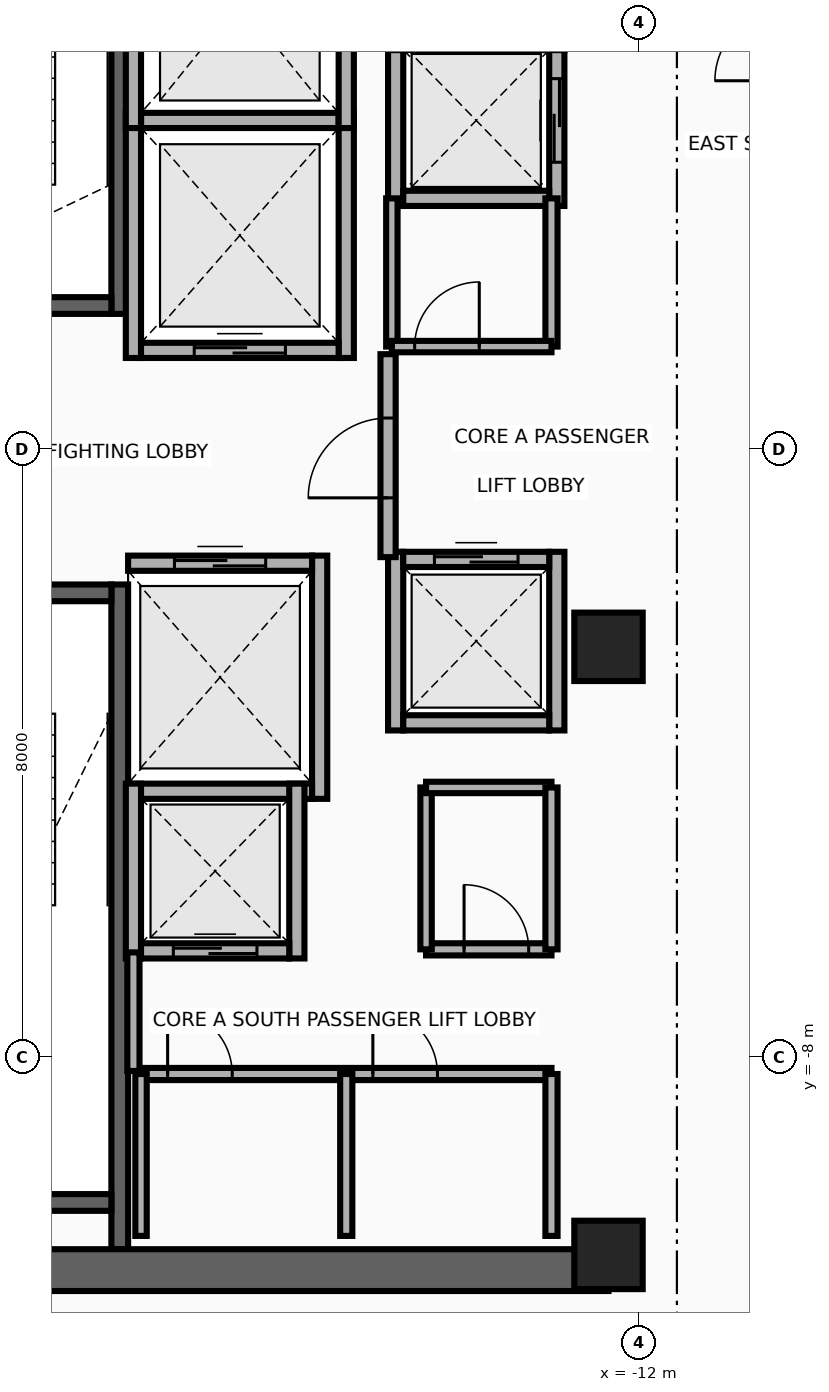
"""IFC4 building model, lengths in metres.
Left out: names, types, materials, properties, quantities, classifications, styles, units other than length and angle.
Written with IfcOpenShell. Run it as: python <this file> out.ifc"""

import sys

from ifc_helpers import new_model, si_unit, direction, frame, frame_2d, origin, origin_2d, place, context, subcontext, project, spatial, rectangle, extrude, source, transform, mapped, element, fill, save


model = new_model("IFC4")
c1 = context("Model", 3, precision=1e-05, world=origin(), true_north=direction((0.0, 1.0)))
c2 = subcontext(c1, "Body", "Model", "MODEL_VIEW")
j1 = project(units=[si_unit("LENGTHUNIT", "METRE"), si_unit("PLANEANGLEUNIT", "RADIAN")], contexts=[c1])
p1 = place(None, origin())
s1 = spatial("IfcSite", under=j1, at=p1, CompositionType="ELEMENT")
p2 = place(p1, origin())
s2 = spatial("IfcBuilding", under=s1, at=p2, CompositionType="ELEMENT")
p3 = place(p2, frame((0.0, 0.0, 230.0)))
s3 = spatial("IfcBuildingStorey", under=s2, at=p3, CompositionType="ELEMENT", Elevation=230.0)
p4 = place(p3, frame((-18.83, 1.78, 0.0), z_axis=(0.0, 0.0, 1.0), x_axis=(0.0, 1.0, 0.0)))
e1 = element("IfcWall", 1, at=p4, inside=s3, PredefinedType="SHEAR", context=c2, shape_type="SweptSolid", body=[
    extrude(rectangle(XDim=8.745, YDim=0.22, at=frame_2d((4.373, 0.0))), origin(), (0.0, 0.0, 1.0), 3.26),
])
p5 = place(p3, frame((-22.05, 1.89, 0.0), z_axis=(0.0, 0.0, 1.0), x_axis=(1.0, 0.0, 0.0)))
e2 = element("IfcWall", 2, at=p5, inside=s3, PredefinedType="SHEAR", context=c2, shape_type="SweptSolid", body=[
    extrude(rectangle(XDim=3.11, YDim=0.22, at=frame_2d((1.555, 0.0))), origin(), (0.0, 0.0, 1.0), 3.26),
])
p6 = place(p5, frame((1.0, 0.0, 0.0)))
e3 = element("IfcOpeningElement", 3, at=p6, cuts=e2, PredefinedType="OPENING", context=c2, shape_type="SweptSolid", body=[
    extrude(rectangle(XDim=1.1, YDim=2.15, at=frame_2d((0.55, 1.075))), frame((0.0, 0.125, 0.0), z_axis=(0.0, -1.0, 0.0), x_axis=(1.0, 0.0, 0.0)), (0.0, 0.0, 1.0), 0.25),
])
p7 = place(p3, frame((-18.83, -10.525, 0.0), z_axis=(0.0, 0.0, 1.0), x_axis=(0.0, 1.0, 0.0)))
e4 = element("IfcWall", 4, at=p7, inside=s3, PredefinedType="SHEAR", context=c2, shape_type="SweptSolid", body=[
    extrude(rectangle(XDim=8.745, YDim=0.22, at=frame_2d((4.373, 0.0))), origin(), (0.0, 0.0, 1.0), 3.26),
])
p8 = place(p3, frame((-22.05, -9.91, 0.0), z_axis=(0.0, 0.0, 1.0), x_axis=(1.0, 0.0, 0.0)))
e5 = element("IfcWall", 5, at=p8, inside=s3, PredefinedType="SHEAR", context=c2, shape_type="SweptSolid", body=[
    extrude(rectangle(XDim=3.11, YDim=0.22, at=frame_2d((1.555, 0.0))), origin(), (0.0, 0.0, 1.0), 3.26),
])
p9 = place(p3, frame((-22.05, -1.89, 0.0), z_axis=(0.0, 0.0, 1.0), x_axis=(1.0, 0.0, 0.0)))
e6 = element("IfcWall", 6, at=p9, inside=s3, PredefinedType="SHEAR", context=c2, shape_type="SweptSolid", body=[
    extrude(rectangle(XDim=3.11, YDim=0.22, at=frame_2d((1.555, 0.0))), origin(), (0.0, 0.0, 1.0), 3.26),
])
p10 = place(p9, frame((1.0, 0.0, 0.0)))
e7 = element("IfcOpeningElement", 7, at=p10, cuts=e6, PredefinedType="OPENING", context=c2, shape_type="SweptSolid", body=[
    extrude(rectangle(XDim=1.1, YDim=2.15, at=frame_2d((0.55, 1.075))), frame((0.0, 0.125, 0.0), z_axis=(0.0, -1.0, 0.0), x_axis=(1.0, 0.0, 0.0)), (0.0, 0.0, 1.0), 0.25),
])
p11 = place(p3, frame((-22.65, -10.8, 0.0), z_axis=(0.0, 0.0, 1.0), x_axis=(1.0, 0.0, 0.0)))
e8 = element("IfcWall", 8, at=p11, inside=s3, PredefinedType="SHEAR", context=c2, shape_type="SweptSolid", body=[
    extrude(rectangle(XDim=10.25, YDim=0.55, at=frame_2d((5.125, 0.0))), origin(), (0.0, 0.0, 1.0), 3.26),
])
m1 = source(origin(), c2, "Body", "SweptSolid", [
    extrude(rectangle(XDim=0.9, YDim=0.9, at=origin_2d()), origin(), (0.0, 0.0, 1.0), 3.5),
])
for number, where, z_axis, x_axis in (
    (9, (-12.4, -10.6, 0.0), (0.0, 0.0, 1.0), (1.0, 0.0, 0.0)),
    (10, (-12.4, -2.6, 0.0), (0.0, 0.0, 1.0), (1.0, 0.0, 0.0)),
):
    element("IfcColumn", number, at=place(p3, frame(where, z_axis=z_axis, x_axis=x_axis)), inside=s3, PredefinedType="COLUMN", context=c2, shape_type="MappedRepresentation", body=[
        mapped(m1, transform((0.0, 0.0, 0.0), x_axis=(1.0, 0.0, 0.0), y_axis=(0.0, 1.0, 0.0), z_axis=(0.0, 0.0, 1.0), scale=1.0)),
    ])
for number, where, z_axis, x_axis in (
    (11, (-18.65, 1.2, 0.0), (0.0, 0.0, 1.0), (0.0, 1.0, 0.0)),
    (12, (-15.85, 1.2, 0.0), (0.0, 0.0, 1.0), (0.0, 1.0, 0.0)),
):
    element("IfcWall", number, at=place(p3, frame(where, z_axis=z_axis, x_axis=x_axis)), inside=s3, PredefinedType="MOVABLE", context=c2, shape_type="SweptSolid", body=[
        extrude(rectangle(XDim=3.225, YDim=0.2, at=frame_2d((1.613, 0.0))), origin(), (0.0, 0.0, 1.0), 3.26),
    ])
p12 = place(p3, frame((-18.55, 1.3, 0.0), z_axis=(0.0, 0.0, 1.0), x_axis=(1.0, 0.0, 0.0)))
e13 = element("IfcWall", 13, at=p12, inside=s3, PredefinedType="MOVABLE", context=c2, shape_type="SweptSolid", body=[
    extrude(rectangle(XDim=2.6, YDim=0.2, at=frame_2d((1.3, 0.0))), origin(), (0.0, 0.0, 1.0), 3.26),
])
p13 = place(p12, frame((0.7, 0.0, 0.0)))
e14 = element("IfcOpeningElement", 14, at=p13, cuts=e13, PredefinedType="OPENING", context=c2, shape_type="SweptSolid", body=[
    extrude(rectangle(XDim=1.2, YDim=2.1, at=frame_2d((0.6, 1.05))), frame((0.0, 0.115, 0.0), z_axis=(0.0, -1.0, 0.0), x_axis=(1.0, 0.0, 0.0)), (0.0, 0.0, 1.0), 0.23),
])
p14 = place(p3, frame((-18.55, 4.325, 0.0), z_axis=(0.0, 0.0, 1.0), x_axis=(1.0, 0.0, 0.0)))
e15 = element("IfcWall", 15, at=p14, inside=s3, PredefinedType="MOVABLE", context=c2, shape_type="SweptSolid", body=[
    extrude(rectangle(XDim=2.6, YDim=0.2, at=frame_2d((1.3, 0.0))), origin(), (0.0, 0.0, 1.0), 3.26),
])
p15 = place(p3, frame((-16.2, -4.6, 0.0), z_axis=(0.0, 0.0, 1.0), x_axis=(0.0, 1.0, 0.0)))
e16 = element("IfcWall", 16, at=p15, inside=s3, PredefinedType="MOVABLE", context=c2, shape_type="SweptSolid", body=[
    extrude(rectangle(XDim=3.2, YDim=0.2, at=frame_2d((1.6, 0.0))), origin(), (0.0, 0.0, 1.0), 3.26),
])
p16 = place(p3, frame((-18.72, -4.5, 0.0), z_axis=(0.0, 0.0, 1.0), x_axis=(1.0, 0.0, 0.0)))
e17 = element("IfcWall", 17, at=p16, inside=s3, PredefinedType="MOVABLE", context=c2, shape_type="SweptSolid", body=[
    extrude(rectangle(XDim=2.42, YDim=0.2, at=frame_2d((1.21, 0.0))), origin(), (0.0, 0.0, 1.0), 3.26),
])
p17 = place(p3, frame((-18.72, -1.5, 0.0), z_axis=(0.0, 0.0, 1.0), x_axis=(1.0, 0.0, 0.0)))
e18 = element("IfcWall", 18, at=p17, inside=s3, PredefinedType="MOVABLE", context=c2, shape_type="SweptSolid", body=[
    extrude(rectangle(XDim=2.42, YDim=0.2, at=frame_2d((1.21, 0.0))), origin(), (0.0, 0.0, 1.0), 3.26),
])
p18 = place(p17, frame((0.61, 0.0, 0.0)))
e19 = element("IfcOpeningElement", 19, at=p18, cuts=e18, PredefinedType="OPENING", context=c2, shape_type="SweptSolid", body=[
    extrude(rectangle(XDim=1.2, YDim=2.1, at=frame_2d((0.6, 1.05))), frame((0.0, 0.115, 0.0), z_axis=(0.0, -1.0, 0.0), x_axis=(1.0, 0.0, 0.0)), (0.0, 0.0, 1.0), 0.23),
])
for number, where, z_axis, x_axis in (
    (20, (-18.65, 4.225, 0.0), (0.0, 0.0, 1.0), (0.0, 1.0, 0.0)),
    (21, (-15.85, 4.225, 0.0), (0.0, 0.0, 1.0), (0.0, 1.0, 0.0)),
):
    element("IfcWall", number, at=place(p3, frame(where, z_axis=z_axis, x_axis=x_axis)), inside=s3, PredefinedType="MOVABLE", context=c2, shape_type="SweptSolid", body=[
        extrude(rectangle(XDim=3.325, YDim=0.2, at=frame_2d((1.663, 0.0))), origin(), (0.0, 0.0, 1.0), 3.26),
    ])
p19 = place(p3, frame((-15.2, 3.2, 0.0), z_axis=(0.0, 0.0, 1.0), x_axis=(0.0, 1.0, 0.0)))
e22 = element("IfcWall", 22, at=p19, inside=s3, PredefinedType="MOVABLE", context=c2, shape_type="SweptSolid", body=[
    extrude(rectangle(XDim=2.25, YDim=0.2, at=frame_2d((1.125, 0.0))), origin(), (0.0, 0.0, 1.0), 3.26),
])
p20 = place(p3, frame((-13.08, 3.2, 0.0), z_axis=(0.0, 0.0, 1.0), x_axis=(0.0, 1.0, 0.0)))
e23 = element("IfcWall", 23, at=p20, inside=s3, PredefinedType="MOVABLE", context=c2, shape_type="SweptSolid", body=[
    extrude(rectangle(XDim=2.25, YDim=0.2, at=frame_2d((1.125, 0.0))), origin(), (0.0, 0.0, 1.0), 3.26),
])
p21 = place(p20, frame((0.575, 0.0, 0.0)))
e24 = element("IfcOpeningElement", 24, at=p21, cuts=e23, PredefinedType="OPENING", context=c2, shape_type="SweptSolid", body=[
    extrude(rectangle(XDim=1.1, YDim=2.1, at=frame_2d((0.55, 1.05))), frame((0.0, 0.115, 0.0), z_axis=(0.0, -1.0, 0.0), x_axis=(1.0, 0.0, 0.0)), (0.0, 0.0, 1.0), 0.23),
])
p22 = place(p3, frame((-15.1, 3.3, 0.0), z_axis=(0.0, 0.0, 1.0), x_axis=(1.0, 0.0, 0.0)))
e25 = element("IfcWall", 25, at=p22, inside=s3, PredefinedType="MOVABLE", context=c2, shape_type="SweptSolid", body=[
    extrude(rectangle(XDim=1.92, YDim=0.2, at=frame_2d((0.96, 0.0))), origin(), (0.0, 0.0, 1.0), 3.26),
])
for number, where, z_axis, x_axis in (
    (26, (-18.65, -6.7, 0.0), (0.0, 0.0, 1.0), (0.0, 1.0, 0.0)),
    (27, (-16.5, -6.7, 0.0), (0.0, 0.0, 1.0), (0.0, 1.0, 0.0)),
):
    element("IfcWall", number, at=place(p3, frame(where, z_axis=z_axis, x_axis=x_axis)), inside=s3, PredefinedType="MOVABLE", context=c2, shape_type="SweptSolid", body=[
        extrude(rectangle(XDim=2.3, YDim=0.2, at=frame_2d((1.15, 0.0))), origin(), (0.0, 0.0, 1.0), 3.26),
    ])
p23 = place(p3, frame((-18.55, -6.6, 0.0), z_axis=(0.0, 0.0, 1.0), x_axis=(1.0, 0.0, 0.0)))
e28 = element("IfcWall", 28, at=p23, inside=s3, PredefinedType="MOVABLE", context=c2, shape_type="SweptSolid", body=[
    extrude(rectangle(XDim=1.95, YDim=0.2, at=frame_2d((0.975, 0.0))), origin(), (0.0, 0.0, 1.0), 3.26),
])
p24 = place(p23, frame((0.425, 0.0, 0.0)))
e29 = element("IfcOpeningElement", 29, at=p24, cuts=e28, PredefinedType="OPENING", context=c2, shape_type="SweptSolid", body=[
    extrude(rectangle(XDim=1.1, YDim=2.1, at=frame_2d((0.55, 1.05))), frame((0.0, 0.115, 0.0), z_axis=(0.0, -1.0, 0.0), x_axis=(1.0, 0.0, 0.0)), (0.0, 0.0, 1.0), 0.23),
])
for number, where, z_axis, x_axis in (
    (30, (-15.2, -3.7, 0.0), (0.0, 0.0, 1.0), (0.0, 1.0, 0.0)),
    (31, (-13.08, -3.7, 0.0), (0.0, 0.0, 1.0), (0.0, 1.0, 0.0)),
):
    element("IfcWall", number, at=place(p3, frame(where, z_axis=z_axis, x_axis=x_axis)), inside=s3, PredefinedType="MOVABLE", context=c2, shape_type="SweptSolid", body=[
        extrude(rectangle(XDim=2.35, YDim=0.2, at=frame_2d((1.175, 0.0))), origin(), (0.0, 0.0, 1.0), 3.26),
    ])
p25 = place(p3, frame((-15.1, -3.6, 0.0), z_axis=(0.0, 0.0, 1.0), x_axis=(1.0, 0.0, 0.0)))
e32 = element("IfcWall", 32, at=p25, inside=s3, PredefinedType="MOVABLE", context=c2, shape_type="SweptSolid", body=[
    extrude(rectangle(XDim=1.92, YDim=0.2, at=frame_2d((0.96, 0.0))), origin(), (0.0, 0.0, 1.0), 3.26),
])
p26 = place(p3, frame((-15.1, -1.45, 0.0), z_axis=(0.0, 0.0, 1.0), x_axis=(1.0, 0.0, 0.0)))
e33 = element("IfcWall", 33, at=p26, inside=s3, PredefinedType="MOVABLE", context=c2, shape_type="SweptSolid", body=[
    extrude(rectangle(XDim=1.92, YDim=0.2, at=frame_2d((0.96, 0.0))), origin(), (0.0, 0.0, 1.0), 3.26),
])
p27 = place(p26, frame((0.41, 0.0, 0.0)))
e34 = element("IfcOpeningElement", 34, at=p27, cuts=e33, PredefinedType="OPENING", context=c2, shape_type="SweptSolid", body=[
    extrude(rectangle(XDim=1.1, YDim=2.1, at=frame_2d((0.55, 1.05))), frame((0.0, 0.115, 0.0), z_axis=(0.0, -1.0, 0.0), x_axis=(1.0, 0.0, 0.0)), (0.0, 0.0, 1.0), 0.23),
])
p28 = place(p3, frame((-15.3, -1.42, 0.0), z_axis=(0.0, 0.0, 1.0), x_axis=(0.0, 1.0, 0.0)))
e35 = element("IfcWall", 35, at=p28, inside=s3, PredefinedType="PARTITIONING", context=c2, shape_type="SweptSolid", body=[
    extrude(rectangle(XDim=2.67, YDim=0.2, at=frame_2d((1.335, 0.0))), origin(), (0.0, 0.0, 1.0), 3.26),
])
p29 = place(p28, frame((0.78, 0.0, 0.0)))
e36 = element("IfcOpeningElement", 36, at=p29, cuts=e35, PredefinedType="OPENING", context=c2, shape_type="SweptSolid", body=[
    extrude(rectangle(XDim=1.05, YDim=2.15, at=frame_2d((0.525, 1.075))), frame((0.0, 0.115, 0.0), z_axis=(0.0, -1.0, 0.0), x_axis=(1.0, 0.0, 0.0)), (0.0, 0.0, 1.0), 0.23),
])
p30 = place(p3, frame((-18.65, -8.18, 0.0), z_axis=(0.0, 0.0, 1.0), x_axis=(0.0, 1.0, 0.0)))
e37 = element("IfcWall", 37, at=p30, inside=s3, PredefinedType="PARTITIONING", context=c2, shape_type="SweptSolid", body=[
    extrude(rectangle(XDim=1.56, YDim=0.16, at=frame_2d((0.78, 0.0))), origin(), (0.0, 0.0, 1.0), 3.26),
])
p31 = place(p3, frame((-18.55, -8.22, 0.0), z_axis=(0.0, 0.0, 1.0), x_axis=(1.0, 0.0, 0.0)))
e38 = element("IfcWall", 38, at=p31, inside=s3, PredefinedType="PARTITIONING", context=c2, shape_type="SweptSolid", body=[
    extrude(rectangle(XDim=5.4, YDim=0.16, at=frame_2d((2.7, 0.0))), origin(), (0.0, 0.0, 1.0), 3.26),
])
p32 = place(p31, frame((0.35, 0.0, 0.0)))
e39 = element("IfcOpeningElement", 39, at=p32, cuts=e38, PredefinedType="OPENING", context=c2, shape_type="SweptSolid", body=[
    extrude(rectangle(XDim=0.85, YDim=2.05, at=frame_2d((0.425, 1.025))), frame((0.0, 0.095, 0.0), z_axis=(0.0, -1.0, 0.0), x_axis=(1.0, 0.0, 0.0)), (0.0, 0.0, 1.0), 0.19),
])
p33 = place(p31, frame((3.05, 0.0, 0.0)))
e40 = element("IfcOpeningElement", 40, at=p33, cuts=e38, PredefinedType="OPENING", context=c2, shape_type="SweptSolid", body=[
    extrude(rectangle(XDim=0.85, YDim=2.05, at=frame_2d((0.425, 1.025))), frame((0.0, 0.095, 0.0), z_axis=(0.0, -1.0, 0.0), x_axis=(1.0, 0.0, 0.0)), (0.0, 0.0, 1.0), 0.19),
])
p34 = place(p3, frame((-18.55, -10.35, 0.0), z_axis=(0.0, 0.0, 1.0), x_axis=(0.0, 1.0, 0.0)))
e41 = element("IfcWall", 41, at=p34, inside=s3, PredefinedType="PARTITIONING", context=c2, shape_type="SweptSolid", body=[
    extrude(rectangle(XDim=2.13, YDim=0.15, at=frame_2d((1.065, 0.0))), origin(), (0.0, 0.0, 1.0), 3.26),
])
for number, where, z_axis, x_axis in (
    (42, (-13.15, -10.35, 0.0), (0.0, 0.0, 1.0), (0.0, 1.0, 0.0)),
    (43, (-15.85, -10.35, 0.0), (0.0, 0.0, 1.0), (0.0, 1.0, 0.0)),
):
    element("IfcWall", number, at=place(p3, frame(where, z_axis=z_axis, x_axis=x_axis)), inside=s3, PredefinedType="PARTITIONING", context=c2, shape_type="SweptSolid", body=[
        extrude(rectangle(XDim=2.13, YDim=0.16, at=frame_2d((1.065, 0.0))), origin(), (0.0, 0.0, 1.0), 3.26),
    ])
p35 = place(p3, frame((-14.8, -6.58, 0.0), z_axis=(0.0, 0.0, 1.0), x_axis=(1.0, 0.0, 0.0)))
e44 = element("IfcWall", 44, at=p35, inside=s3, PredefinedType="PARTITIONING", context=c2, shape_type="SweptSolid", body=[
    extrude(rectangle(XDim=1.65, YDim=0.16, at=frame_2d((0.825, 0.0))), origin(), (0.0, 0.0, 1.0), 3.26),
])
p36 = place(p35, frame((0.5, 0.0, 0.0)))
e45 = element("IfcOpeningElement", 45, at=p36, cuts=e44, PredefinedType="OPENING", context=c2, shape_type="SweptSolid", body=[
    extrude(rectangle(XDim=0.85, YDim=2.05, at=frame_2d((0.425, 1.025))), frame((0.0, 0.095, 0.0), z_axis=(0.0, -1.0, 0.0), x_axis=(1.0, 0.0, 0.0)), (0.0, 0.0, 1.0), 0.19),
])
p37 = place(p3, frame((-14.8, -6.58, 0.0), z_axis=(0.0, 0.0, 1.0), x_axis=(0.0, 1.0, 0.0)))
e46 = element("IfcWall", 46, at=p37, inside=s3, PredefinedType="PARTITIONING", context=c2, shape_type="SweptSolid", body=[
    extrude(rectangle(XDim=2.13, YDim=0.15, at=frame_2d((1.065, 0.0))), origin(), (0.0, 0.0, 1.0), 3.26),
])
p38 = place(p3, frame((-14.8, -4.45, 0.0), z_axis=(0.0, 0.0, 1.0), x_axis=(1.0, 0.0, 0.0)))
e47 = element("IfcWall", 47, at=p38, inside=s3, PredefinedType="PARTITIONING", context=c2, shape_type="SweptSolid", body=[
    extrude(rectangle(XDim=1.65, YDim=0.15, at=frame_2d((0.825, 0.0))), origin(), (0.0, 0.0, 1.0), 3.26),
])
p39 = place(p3, frame((-13.15, -6.58, 0.0), z_axis=(0.0, 0.0, 1.0), x_axis=(0.0, 1.0, 0.0)))
e48 = element("IfcWall", 48, at=p39, inside=s3, PredefinedType="PARTITIONING", context=c2, shape_type="SweptSolid", body=[
    extrude(rectangle(XDim=2.13, YDim=0.16, at=frame_2d((1.065, 0.0))), origin(), (0.0, 0.0, 1.0), 3.26),
])
p40 = place(p3, frame((-13.15, 1.35, 0.0), z_axis=(0.0, 0.0, 1.0), x_axis=(0.0, 1.0, 0.0)))
e49 = element("IfcWall", 49, at=p40, inside=s3, PredefinedType="PARTITIONING", context=c2, shape_type="SweptSolid", body=[
    extrude(rectangle(XDim=1.95, YDim=0.16, at=frame_2d((0.975, 0.0))), origin(), (0.0, 0.0, 1.0), 3.26),
])
p41 = place(p3, frame((-15.25, 1.35, 0.0), z_axis=(0.0, 0.0, 1.0), x_axis=(0.0, 1.0, 0.0)))
e50 = element("IfcWall", 50, at=p41, inside=s3, PredefinedType="PARTITIONING", context=c2, shape_type="SweptSolid", body=[
    extrude(rectangle(XDim=1.95, YDim=0.15, at=frame_2d((0.975, 0.0))), origin(), (0.0, 0.0, 1.0), 3.26),
])
p42 = place(p3, frame((-15.25, 1.35, 0.0), z_axis=(0.0, 0.0, 1.0), x_axis=(1.0, 0.0, 0.0)))
e51 = element("IfcWall", 51, at=p42, inside=s3, PredefinedType="PARTITIONING", context=c2, shape_type="SweptSolid", body=[
    extrude(rectangle(XDim=2.1, YDim=0.15, at=frame_2d((1.05, 0.0))), origin(), (0.0, 0.0, 1.0), 3.26),
])
p43 = place(p42, frame((0.3, 0.0, 0.0)))
e52 = element("IfcOpeningElement", 52, at=p43, cuts=e51, PredefinedType="OPENING", context=c2, shape_type="SweptSolid", body=[
    extrude(rectangle(XDim=0.85, YDim=2.05, at=frame_2d((0.425, 1.025))), frame((0.0, 0.09, 0.0), z_axis=(0.0, -1.0, 0.0), x_axis=(1.0, 0.0, 0.0)), (0.0, 0.0, 1.0), 0.18),
])
p44 = place(p13, origin())
e53 = element("IfcDoor", 53, at=p44, inside=s3, OperationType="DOUBLE_DOOR_SLIDING", PredefinedType="DOOR", context=c2, shape_type="SweptSolid", body=[
    extrude(rectangle(XDim=1.2, YDim=2.1, at=frame_2d((0.6, 1.05))), frame((0.0, 0.025, 0.0), z_axis=(0.0, -1.0, 0.0), x_axis=(1.0, 0.0, 0.0)), (0.0, 0.0, 1.0), 0.05),
])
fill(e14, e53)
p45 = place(p18, origin())
e54 = element("IfcDoor", 54, at=p45, inside=s3, OperationType="DOUBLE_DOOR_SLIDING", PredefinedType="DOOR", context=c2, shape_type="SweptSolid", body=[
    extrude(rectangle(XDim=1.2, YDim=2.1, at=frame_2d((0.6, 1.05))), frame((0.0, 0.025, 0.0), z_axis=(0.0, -1.0, 0.0), x_axis=(1.0, 0.0, 0.0)), (0.0, 0.0, 1.0), 0.05),
])
fill(e19, e54)
p46 = place(p21, origin())
e55 = element("IfcDoor", 55, at=p46, inside=s3, OperationType="DOUBLE_DOOR_SLIDING", PredefinedType="DOOR", context=c2, shape_type="SweptSolid", body=[
    extrude(rectangle(XDim=1.1, YDim=2.1, at=frame_2d((0.55, 1.05))), frame((0.0, 0.025, 0.0), z_axis=(0.0, -1.0, 0.0), x_axis=(1.0, 0.0, 0.0)), (0.0, 0.0, 1.0), 0.05),
])
fill(e24, e55)
p47 = place(p24, origin())
e56 = element("IfcDoor", 56, at=p47, inside=s3, OperationType="DOUBLE_DOOR_SLIDING", PredefinedType="DOOR", context=c2, shape_type="SweptSolid", body=[
    extrude(rectangle(XDim=1.1, YDim=2.1, at=frame_2d((0.55, 1.05))), frame((0.0, 0.025, 0.0), z_axis=(0.0, -1.0, 0.0), x_axis=(1.0, 0.0, 0.0)), (0.0, 0.0, 1.0), 0.05),
])
fill(e29, e56)
p48 = place(p27, origin())
e57 = element("IfcDoor", 57, at=p48, inside=s3, OperationType="DOUBLE_DOOR_SLIDING", PredefinedType="DOOR", context=c2, shape_type="SweptSolid", body=[
    extrude(rectangle(XDim=1.1, YDim=2.1, at=frame_2d((0.55, 1.05))), frame((0.0, 0.025, 0.0), z_axis=(0.0, -1.0, 0.0), x_axis=(1.0, 0.0, 0.0)), (0.0, 0.0, 1.0), 0.05),
])
fill(e34, e57)
p49 = place(p29, origin())
e58 = element("IfcDoor", 58, at=p49, inside=s3, OperationType="SINGLE_SWING_RIGHT", PredefinedType="DOOR", context=c2, shape_type="SweptSolid", body=[
    extrude(rectangle(XDim=1.05, YDim=2.15, at=frame_2d((0.525, 1.075))), frame((0.0, 0.025, 0.0), z_axis=(0.0, -1.0, 0.0), x_axis=(1.0, 0.0, 0.0)), (0.0, 0.0, 1.0), 0.05),
])
fill(e36, e58)
p50 = place(p32, origin())
e59 = element("IfcDoor", 59, at=p50, inside=s3, OperationType="SINGLE_SWING_LEFT", PredefinedType="DOOR", context=c2, shape_type="SweptSolid", body=[
    extrude(rectangle(XDim=0.85, YDim=2.05, at=frame_2d((0.425, 1.025))), frame((0.0, 0.025, 0.0), z_axis=(0.0, -1.0, 0.0), x_axis=(1.0, 0.0, 0.0)), (0.0, 0.0, 1.0), 0.05),
])
fill(e39, e59)
p51 = place(p33, origin())
e60 = element("IfcDoor", 60, at=p51, inside=s3, OperationType="SINGLE_SWING_RIGHT", PredefinedType="DOOR", context=c2, shape_type="SweptSolid", body=[
    extrude(rectangle(XDim=0.85, YDim=2.05, at=frame_2d((0.425, 1.025))), frame((0.0, 0.025, 0.0), z_axis=(0.0, -1.0, 0.0), x_axis=(1.0, 0.0, 0.0)), (0.0, 0.0, 1.0), 0.05),
])
fill(e40, e60)
p52 = place(p36, origin())
e61 = element("IfcDoor", 61, at=p52, inside=s3, OperationType="SINGLE_SWING_LEFT", PredefinedType="DOOR", context=c2, shape_type="SweptSolid", body=[
    extrude(rectangle(XDim=0.85, YDim=2.05, at=frame_2d((0.425, 1.025))), frame((0.0, 0.025, 0.0), z_axis=(0.0, -1.0, 0.0), x_axis=(1.0, 0.0, 0.0)), (0.0, 0.0, 1.0), 0.05),
])
fill(e45, e61)
p53 = place(p43, origin())
e62 = element("IfcDoor", 62, at=p53, inside=s3, OperationType="SINGLE_SWING_RIGHT", PredefinedType="DOOR", context=c2, shape_type="SweptSolid", body=[
    extrude(rectangle(XDim=0.85, YDim=2.05, at=frame_2d((0.425, 1.025))), frame((0.0, 0.025, 0.0), z_axis=(0.0, -1.0, 0.0), x_axis=(1.0, 0.0, 0.0)), (0.0, 0.0, 1.0), 0.05),
])
fill(e52, e62)
save(model, sys.argv[1])
